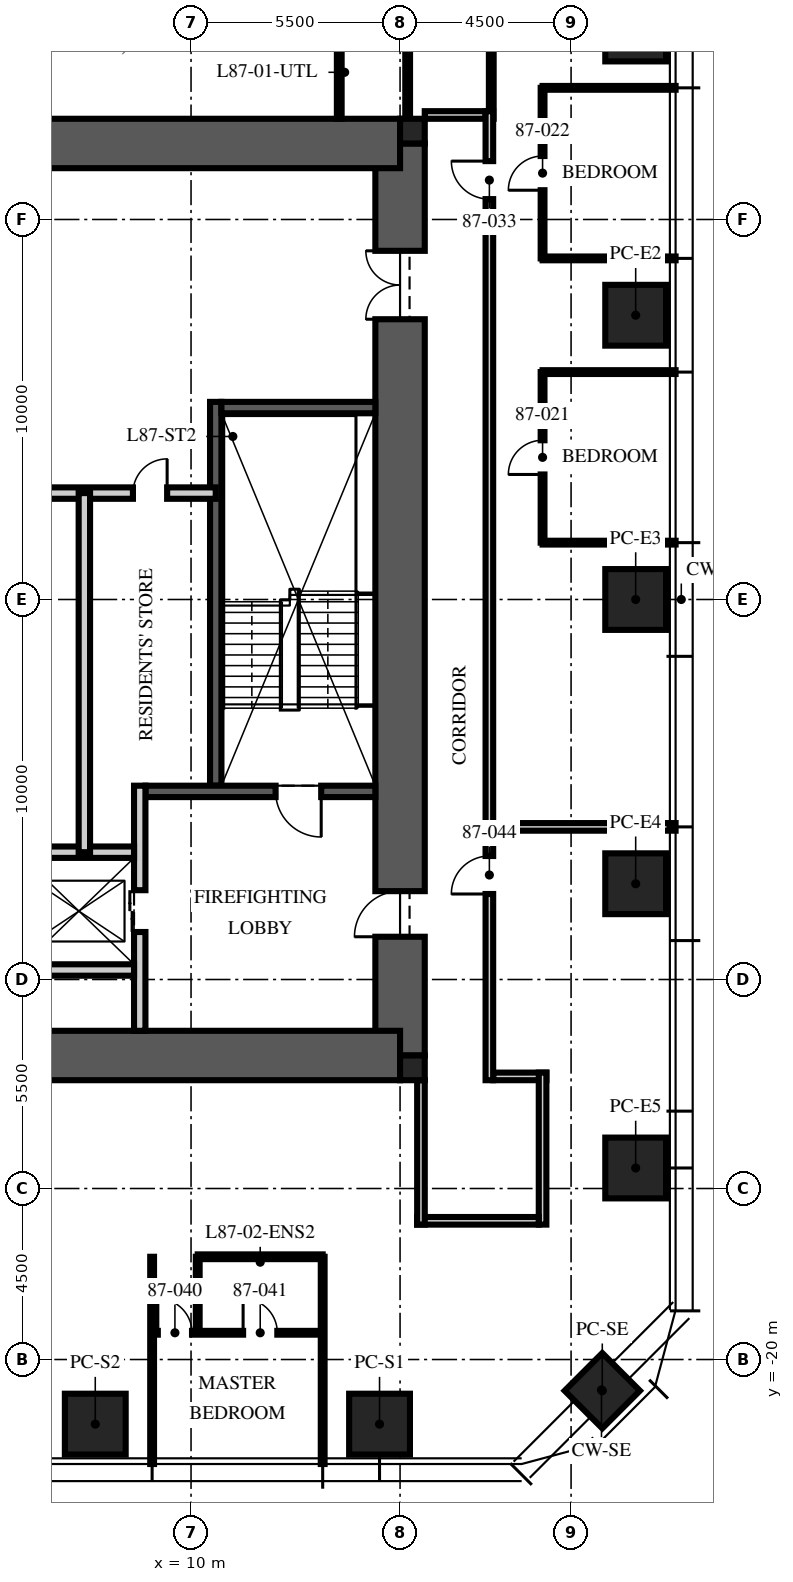
"""IFC4 building model, lengths in metres.
Left out: names, types, materials, properties, quantities, classifications, styles, units other than length and angle.
Written with IfcOpenShell. Run it as: python <this file> out.ifc"""

import sys

from ifc_helpers import new_model, si_unit, direction, frame, frame_2d, origin, origin_2d, place, context, subcontext, project, spatial, rectangle, extrude, element, fill, save


model = new_model("IFC4")
c1 = context("Model", 3, precision=1e-05, world=origin(), true_north=direction((0.0, 1.0)))
c2 = subcontext(c1, "Body", "Model", "MODEL_VIEW")
j1 = project(units=[si_unit("LENGTHUNIT", "METRE"), si_unit("PLANEANGLEUNIT", "RADIAN")], contexts=[c1])
p1 = place(None, origin())
s1 = spatial("IfcSite", under=j1, at=p1, CompositionType="ELEMENT")
p2 = place(p1, origin())
s2 = spatial("IfcBuilding", under=s1, at=p2, CompositionType="ELEMENT")
p3 = place(p2, frame((0.0, 0.0, 345.75)))
s3 = spatial("IfcBuildingStorey", under=s2, at=p3, CompositionType="ELEMENT", Elevation=345.75)
p4 = place(p3, frame((15.5, -12.0, -0.25), z_axis=(0.0, 0.0, 1.0), x_axis=(0.0, 1.0, 0.0)))
e1 = element("IfcWall", 1, at=p4, inside=s3, PredefinedType="SHEAR", context=c2, shape_type="SweptSolid", body=[
    extrude(rectangle(XDim=24.0, YDim=1.3, at=frame_2d((12.0, 0.0))), origin(), (0.0, 0.0, 1.0), 3.75),
])
p5 = place(p4, frame((3.125, 0.0, 0.25)))
e2 = element("IfcOpeningElement", 2, at=p5, cuts=e1, PredefinedType="OPENING", context=c2, shape_type="SweptSolid", body=[
    extrude(rectangle(XDim=1.2, YDim=2.1, at=frame_2d((0.6, 1.05))), frame((0.0, 0.66, 0.0), z_axis=(0.0, -1.0, 0.0), x_axis=(1.0, 0.0, 0.0)), (0.0, 0.0, 1.0), 1.32),
])
p6 = place(p4, frame((19.375, 0.0, 0.25)))
e3 = element("IfcOpeningElement", 3, at=p6, cuts=e1, PredefinedType="OPENING", context=c2, shape_type="SweptSolid", body=[
    extrude(rectangle(XDim=1.8, YDim=2.1, at=frame_2d((0.9, 1.05))), frame((0.0, 0.66, 0.0), z_axis=(0.0, -1.0, 0.0), x_axis=(1.0, 0.0, 0.0)), (0.0, 0.0, 1.0), 1.32),
])
for number, where, z_axis, x_axis in (
    (4, (-15.5, 12.0, -0.25), (0.0, 0.0, 1.0), (1.0, 0.0, 0.0)),
    (5, (-15.5, -12.0, -0.25), (0.0, 0.0, 1.0), (1.0, 0.0, 0.0)),
):
    element("IfcWall", number, at=place(p3, frame(where, z_axis=z_axis, x_axis=x_axis)), inside=s3, PredefinedType="SHEAR", context=c2, shape_type="SweptSolid", body=[
        extrude(rectangle(XDim=31.0, YDim=1.3, at=frame_2d((15.5, 0.0))), origin(), (0.0, 0.0, 1.0), 3.75),
    ])
for number, where, z_axis, x_axis in (
    (6, (15.825, 12.325, -0.25), (0.0, 0.0, 1.0), (1.0, 0.0, 0.0)),
    (7, (15.825, -12.325, -0.25), (0.0, 0.0, 1.0), (1.0, 0.0, 0.0)),
):
    element("IfcColumn", number, at=place(p3, frame(where, z_axis=z_axis, x_axis=x_axis)), inside=s3, PredefinedType="COLUMN", context=c2, shape_type="SweptSolid", body=[
        extrude(rectangle(XDim=0.65, YDim=0.65, at=origin_2d()), origin(), (0.0, 0.0, 1.0), 3.75),
    ])
for number, where, z_axis, x_axis in (
    (8, (21.7, 14.96, 0.0), (0.0, 0.0, 1.0), (0.0, 1.0, 0.0)),
    (9, (21.7, 7.48, 0.0), (0.0, 0.0, 1.0), (0.0, 1.0, 0.0)),
    (10, (21.7, 0.0, 0.0), (0.0, 0.0, 1.0), (0.0, 1.0, 0.0)),
    (11, (21.7, -7.48, 0.0), (0.0, 0.0, 1.0), (0.0, 1.0, 0.0)),
    (12, (21.7, -14.96, 0.0), (0.0, 0.0, 1.0), (0.0, 1.0, 0.0)),
    (13, (14.96, -21.7, 0.0), (0.0, 0.0, 1.0), (1.0, 0.0, 0.0)),
    (14, (7.48, -21.7, 0.0), (0.0, 0.0, 1.0), (1.0, 0.0, 0.0)),
):
    element("IfcColumn", number, at=place(p3, frame(where, z_axis=z_axis, x_axis=x_axis)), inside=s3, PredefinedType="COLUMN", context=c2, shape_type="SweptSolid", body=[
        extrude(rectangle(XDim=1.6, YDim=1.6, at=origin_2d()), origin(), (0.0, 0.0, 1.0), 3.75),
    ])
p7 = place(p3, frame((20.821, -20.821, 0.0), z_axis=(0.0, 0.0, 1.0), x_axis=(0.707106781187, 0.707106781187, 0.0)))
e15 = element("IfcColumn", 15, at=p7, inside=s3, PredefinedType="COLUMN", context=c2, shape_type="SweptSolid", body=[
    extrude(rectangle(XDim=1.4, YDim=1.4, at=origin_2d()), origin(), (0.0, 0.0, 1.0), 3.75),
])
p8 = place(p3, frame((10.65, -4.9, 0.0), z_axis=(0.0, 0.0, 1.0), x_axis=(0.0, 1.0, 0.0)))
e16 = element("IfcWall", 16, at=p8, inside=s3, PredefinedType="SOLIDWALL", context=c2, shape_type="SweptSolid", body=[
    extrude(rectangle(XDim=10.1, YDim=0.3, at=frame_2d((5.05, 0.0))), origin(), (0.0, 0.0, 1.0), 3.5),
])
p9 = place(p3, frame((14.85, -5.05, 0.0), z_axis=(0.0, 0.0, 1.0), x_axis=(-1.0, 0.0, 0.0)))
e17 = element("IfcWall", 17, at=p9, inside=s3, PredefinedType="SOLIDWALL", context=c2, shape_type="SweptSolid", body=[
    extrude(rectangle(XDim=6.05, YDim=0.3, at=frame_2d((3.025, 0.0))), origin(), (0.0, 0.0, 1.0), 3.5),
])
p10 = place(p9, frame((1.425, 0.0, 0.0)))
e18 = element("IfcOpeningElement", 18, at=p10, cuts=e17, PredefinedType="OPENING", context=c2, shape_type="SweptSolid", body=[
    extrude(rectangle(XDim=1.2, YDim=2.1, at=frame_2d((0.6, 1.05))), frame((0.0, 0.16, 0.0), z_axis=(0.0, -1.0, 0.0), x_axis=(1.0, 0.0, 0.0)), (0.0, 0.0, 1.0), 0.32),
])
p11 = place(p3, frame((14.85, 5.05, 0.0), z_axis=(0.0, 0.0, 1.0), x_axis=(-1.0, 0.0, 0.0)))
e19 = element("IfcWall", 19, at=p11, inside=s3, PredefinedType="SOLIDWALL", context=c2, shape_type="SweptSolid", body=[
    extrude(rectangle(XDim=4.05, YDim=0.3, at=frame_2d((2.025, 0.0))), origin(), (0.0, 0.0, 1.0), 3.5),
])
p12 = place(p3, frame((8.65, -11.35, 0.0), z_axis=(0.0, 0.0, 1.0), x_axis=(0.0, 1.0, 0.0)))
e20 = element("IfcWall", 20, at=p12, inside=s3, PredefinedType="PARTITIONING", context=c2, shape_type="SweptSolid", body=[
    extrude(rectangle(XDim=6.45, YDim=0.3, at=frame_2d((3.225, 0.0))), origin(), (0.0, 0.0, 1.0), 3.5),
])
p13 = place(p12, frame((2.6, 0.0, 0.0)))
e21 = element("IfcOpeningElement", 21, at=p13, cuts=e20, PredefinedType="OPENING", context=c2, shape_type="SweptSolid", body=[
    extrude(rectangle(XDim=1.1, YDim=2.1, at=frame_2d((0.55, 1.05))), frame((0.0, 0.16, 0.0), z_axis=(0.0, -1.0, 0.0), x_axis=(1.0, 0.0, 0.0)), (0.0, 0.0, 1.0), 0.32),
])
p14 = place(p3, frame((-8.5, -6.65, 0.0), z_axis=(0.0, 0.0, 1.0), x_axis=(1.0, 0.0, 0.0)))
e22 = element("IfcWall", 22, at=p14, inside=s3, PredefinedType="PARTITIONING", context=c2, shape_type="SweptSolid", body=[
    extrude(rectangle(XDim=17.0, YDim=0.3, at=frame_2d((8.5, 0.0))), origin(), (0.0, 0.0, 1.0), 3.5),
])
p15 = place(p14, frame((7.8, 0.0, 0.0)))
e23 = element("IfcOpeningElement", 23, at=p15, cuts=e22, PredefinedType="OPENING", context=c2, shape_type="SweptSolid", body=[
    extrude(rectangle(XDim=1.3, YDim=2.4, at=frame_2d((0.65, 1.2))), frame((0.0, 0.16, 0.0), z_axis=(0.0, -1.0, 0.0), x_axis=(1.0, 0.0, 0.0)), (0.0, 0.0, 1.0), 0.32),
])
p16 = place(p14, frame((5.65, 0.0, 0.0)))
e24 = element("IfcOpeningElement", 24, at=p16, cuts=e22, PredefinedType="OPENING", context=c2, shape_type="SweptSolid", body=[
    extrude(rectangle(XDim=0.9, YDim=2.1, at=frame_2d((0.45, 1.05))), frame((0.0, 0.16, 0.0), z_axis=(0.0, -1.0, 0.0), x_axis=(1.0, 0.0, 0.0)), (0.0, 0.0, 1.0), 0.32),
])
p17 = place(p14, frame((10.4, 0.0, 0.0)))
e25 = element("IfcOpeningElement", 25, at=p17, cuts=e22, PredefinedType="OPENING", context=c2, shape_type="SweptSolid", body=[
    extrude(rectangle(XDim=0.9, YDim=2.1, at=frame_2d((0.45, 1.05))), frame((0.0, 0.16, 0.0), z_axis=(0.0, -1.0, 0.0), x_axis=(1.0, 0.0, 0.0)), (0.0, 0.0, 1.0), 0.32),
])
p18 = place(p3, frame((5.6, -9.75, 0.0), z_axis=(0.0, 0.0, 1.0), x_axis=(1.0, 0.0, 0.0)))
e26 = element("IfcWall", 26, at=p18, inside=s3, PredefinedType="PARTITIONING", context=c2, shape_type="SweptSolid", body=[
    extrude(rectangle(XDim=2.9, YDim=0.3, at=frame_2d((1.45, 0.0))), origin(), (0.0, 0.0, 1.0), 3.5),
])
p19 = place(p3, frame((-10.65, 2.8, 0.0), z_axis=(0.0, 0.0, 1.0), x_axis=(1.0, 0.0, 0.0)))
e27 = element("IfcWall", 27, at=p19, inside=s3, PredefinedType="PARTITIONING", context=c2, shape_type="SweptSolid", body=[
    extrude(rectangle(XDim=21.3, YDim=0.3, at=frame_2d((10.65, 0.0))), origin(), (0.0, 0.0, 1.0), 3.5),
])
p20 = place(p19, frame((10.05, 0.0, 0.0)))
e28 = element("IfcOpeningElement", 28, at=p20, cuts=e27, PredefinedType="OPENING", context=c2, shape_type="SweptSolid", body=[
    extrude(rectangle(XDim=1.2, YDim=2.1, at=frame_2d((0.6, 1.05))), frame((0.0, 0.16, 0.0), z_axis=(0.0, -1.0, 0.0), x_axis=(1.0, 0.0, 0.0)), (0.0, 0.0, 1.0), 0.32),
])
p21 = place(p19, frame((19.121, 0.0, 0.0)))
e29 = element("IfcOpeningElement", 29, at=p21, cuts=e27, PredefinedType="OPENING", context=c2, shape_type="SweptSolid", body=[
    extrude(rectangle(XDim=0.9, YDim=2.1, at=frame_2d((0.45, 1.05))), frame((0.0, 0.16, 0.0), z_axis=(0.0, -1.0, 0.0), x_axis=(1.0, 0.0, 0.0)), (0.0, 0.0, 1.0), 0.32),
])
p22 = place(p3, frame((7.193, -6.65, 0.0), z_axis=(0.0, 0.0, 1.0), x_axis=(0.0, 1.0, 0.0)))
e30 = element("IfcWall", 30, at=p22, inside=s3, PredefinedType="PARTITIONING", context=c2, shape_type="SweptSolid", body=[
    extrude(rectangle(XDim=9.45, YDim=0.3, at=frame_2d((4.725, 0.0))), origin(), (0.0, 0.0, 1.0), 3.5),
])
p23 = place(p3, frame((17.95, -12.55, 0.0), z_axis=(0.0, 0.0, 1.0), x_axis=(1.0, 0.0, 0.0)))
e31 = element("IfcWall", 31, at=p23, inside=s3, PredefinedType="PARTITIONING", context=c2, shape_type="SweptSolid", body=[
    extrude(rectangle(XDim=1.4, YDim=0.2, at=frame_2d((0.7, 0.0))), origin(), (0.0, 0.0, 1.0), 3.5),
])
p24 = place(p3, frame((19.25, -12.45, 0.0), z_axis=(0.0, 0.0, 1.0), x_axis=(0.0, -1.0, 0.0)))
e32 = element("IfcWall", 32, at=p24, inside=s3, PredefinedType="PARTITIONING", context=c2, shape_type="SweptSolid", body=[
    extrude(rectangle(XDim=4.0, YDim=0.2, at=frame_2d((2.0, 0.0))), origin(), (0.0, 0.0, 1.0), 2.9),
])
p25 = place(p3, frame((19.15, -16.35, 0.0), z_axis=(0.0, 0.0, 1.0), x_axis=(-1.0, 0.0, 0.0)))
e33 = element("IfcWall", 33, at=p25, inside=s3, PredefinedType="PARTITIONING", context=c2, shape_type="SweptSolid", body=[
    extrude(rectangle(XDim=3.2, YDim=0.2, at=frame_2d((1.6, 0.0))), origin(), (0.0, 0.0, 1.0), 2.5),
])
p26 = place(p3, frame((16.05, -16.45, 0.0), z_axis=(0.0, 0.0, 1.0), x_axis=(0.0, 1.0, 0.0)))
e34 = element("IfcWall", 34, at=p26, inside=s3, PredefinedType="PARTITIONING", context=c2, shape_type="SweptSolid", body=[
    extrude(rectangle(XDim=3.8, YDim=0.2, at=frame_2d((1.9, 0.0))), origin(), (0.0, 0.0, 1.0), 2.5),
])
p27 = place(p3, frame((16.15, 12.75, 0.0), z_axis=(0.0, 0.0, 1.0), x_axis=(1.0, 0.0, 0.0)))
e35 = element("IfcWall", 35, at=p27, inside=s3, PredefinedType="PARTITIONING", context=c2, shape_type="SweptSolid", body=[
    extrude(rectangle(XDim=1.6, YDim=0.2, at=frame_2d((0.8, 0.0))), origin(), (0.0, 0.0, 1.0), 2.5),
])
p28 = place(p3, frame((17.95, -5.984, 0.0), z_axis=(0.0, 0.0, 1.0), x_axis=(1.0, 0.0, 0.0)))
e36 = element("IfcWall", 36, at=p28, inside=s3, PredefinedType="PARTITIONING", context=c2, shape_type="SweptSolid", body=[
    extrude(rectangle(XDim=4.8, YDim=0.2, at=frame_2d((2.4, 0.0))), origin(), (0.0, 0.0, 1.0), 2.91),
])
for number, where, z_axis, x_axis in (
    (37, (19.25, 1.496, 0.0), (0.0, 0.0, 1.0), (1.0, 0.0, 0.0)),
    (38, (19.25, 5.984, 0.0), (0.0, 0.0, 1.0), (1.0, 0.0, 0.0)),
    (39, (19.25, 8.976, 0.0), (0.0, 0.0, 1.0), (1.0, 0.0, 0.0)),
    (40, (19.25, 13.464, 0.0), (0.0, 0.0, 1.0), (1.0, 0.0, 0.0)),
):
    element("IfcWall", number, at=place(p3, frame(where, z_axis=z_axis, x_axis=x_axis)), inside=s3, PredefinedType="PARTITIONING", context=c2, shape_type="SweptSolid", body=[
        extrude(rectangle(XDim=3.5, YDim=0.1, at=frame_2d((1.75, 0.0))), origin(), (0.0, 0.0, 1.0), 2.91),
    ])
for number, where, z_axis, x_axis in (
    (41, (8.976, -17.296, 0.0), (0.0, 0.0, 1.0), (0.0, -1.0, 0.0)),
    (42, (13.464, -17.296, 0.0), (0.0, 0.0, 1.0), (0.0, -1.0, 0.0)),
):
    element("IfcWall", number, at=place(p3, frame(where, z_axis=z_axis, x_axis=x_axis)), inside=s3, PredefinedType="PARTITIONING", context=c2, shape_type="SweptSolid", body=[
        extrude(rectangle(XDim=5.454, YDim=0.1, at=frame_2d((2.727, 0.0))), origin(), (0.0, 0.0, 1.0), 2.91),
    ])
p29 = place(p3, frame((19.25, 1.496, 0.0), z_axis=(0.0, 0.0, 1.0), x_axis=(0.0, 1.0, 0.0)))
e43 = element("IfcWall", 43, at=p29, inside=s3, PredefinedType="PARTITIONING", context=c2, shape_type="SweptSolid", body=[
    extrude(rectangle(XDim=4.488, YDim=0.1, at=frame_2d((2.244, 0.0))), origin(), (0.0, 0.0, 1.0), 2.81),
])
p30 = place(p29, frame((1.794, 0.0, 0.0)))
e44 = element("IfcOpeningElement", 44, at=p30, cuts=e43, PredefinedType="OPENING", context=c2, shape_type="SweptSolid", body=[
    extrude(rectangle(XDim=0.9, YDim=2.1, at=frame_2d((0.45, 1.05))), frame((0.0, 0.06, 0.0), z_axis=(0.0, -1.0, 0.0), x_axis=(1.0, 0.0, 0.0)), (0.0, 0.0, 1.0), 0.12),
])
p31 = place(p3, frame((19.25, 8.976, 0.0), z_axis=(0.0, 0.0, 1.0), x_axis=(0.0, 1.0, 0.0)))
e45 = element("IfcWall", 45, at=p31, inside=s3, PredefinedType="PARTITIONING", context=c2, shape_type="SweptSolid", body=[
    extrude(rectangle(XDim=4.488, YDim=0.1, at=frame_2d((2.244, 0.0))), origin(), (0.0, 0.0, 1.0), 2.81),
])
p32 = place(p31, frame((1.794, 0.0, 0.0)))
e46 = element("IfcOpeningElement", 46, at=p32, cuts=e45, PredefinedType="OPENING", context=c2, shape_type="SweptSolid", body=[
    extrude(rectangle(XDim=0.9, YDim=2.1, at=frame_2d((0.45, 1.05))), frame((0.0, 0.06, 0.0), z_axis=(0.0, -1.0, 0.0), x_axis=(1.0, 0.0, 0.0)), (0.0, 0.0, 1.0), 0.12),
])
for number, where, z_axis, x_axis in (
    (47, (17.9, 12.65, 0.0), (0.0, 0.0, 1.0), (0.0, 1.0, 0.0)),
    (48, (15.7, 12.65, 0.0), (0.0, 0.0, 1.0), (0.0, 1.0, 0.0)),
):
    element("IfcWall", number, at=place(p3, frame(where, z_axis=z_axis, x_axis=x_axis)), inside=s3, PredefinedType="PARTITIONING", context=c2, shape_type="SweptSolid", body=[
        extrude(rectangle(XDim=3.346, YDim=0.125, at=frame_2d((1.673, 0.0))), origin(), (0.0, 0.0, 1.0), 2.5),
    ])
p33 = place(p3, frame((13.9, 12.65, 0.0), z_axis=(0.0, 0.0, 1.0), x_axis=(0.0, 1.0, 0.0)))
e49 = element("IfcWall", 49, at=p33, inside=s3, PredefinedType="PARTITIONING", context=c2, shape_type="SweptSolid", body=[
    extrude(rectangle(XDim=3.346, YDim=0.125, at=frame_2d((1.673, 0.0))), origin(), (0.0, 0.0, 1.0), 3.5),
])
p34 = place(p3, frame((8.976, -19.296, 0.0), z_axis=(0.0, 0.0, 1.0), x_axis=(1.0, 0.0, 0.0)))
e50 = element("IfcWall", 50, at=p34, inside=s3, PredefinedType="PARTITIONING", context=c2, shape_type="SweptSolid", body=[
    extrude(rectangle(XDim=4.488, YDim=0.1, at=frame_2d((2.244, 0.0))), origin(), (0.0, 0.0, 1.0), 2.81),
])
p35 = place(p34, frame((0.15, 0.0, 0.0)))
e51 = element("IfcOpeningElement", 51, at=p35, cuts=e50, PredefinedType="OPENING", context=c2, shape_type="SweptSolid", body=[
    extrude(rectangle(XDim=0.9, YDim=2.1, at=frame_2d((0.45, 1.05))), frame((0.0, 0.06, 0.0), z_axis=(0.0, -1.0, 0.0), x_axis=(1.0, 0.0, 0.0)), (0.0, 0.0, 1.0), 0.12),
])
p36 = place(p34, frame((2.394, 0.0, 0.0)))
e52 = element("IfcOpeningElement", 52, at=p36, cuts=e50, PredefinedType="OPENING", context=c2, shape_type="SweptSolid", body=[
    extrude(rectangle(XDim=0.9, YDim=2.1, at=frame_2d((0.45, 1.05))), frame((0.0, 0.06, 0.0), z_axis=(0.0, -1.0, 0.0), x_axis=(1.0, 0.0, 0.0)), (0.0, 0.0, 1.0), 0.12),
])
p37 = place(p3, frame((10.176, -17.296, 0.0), z_axis=(0.0, 0.0, 1.0), x_axis=(0.0, -1.0, 0.0)))
e53 = element("IfcWall", 53, at=p37, inside=s3, PredefinedType="PARTITIONING", context=c2, shape_type="SweptSolid", body=[
    extrude(rectangle(XDim=2.0, YDim=0.1, at=frame_2d((1.0, 0.0))), origin(), (0.0, 0.0, 1.0), 3.5),
])
p38 = place(p3, frame((10.176, -17.296, 0.0), z_axis=(0.0, 0.0, 1.0), x_axis=(1.0, 0.0, 0.0)))
e54 = element("IfcWall", 54, at=p38, inside=s3, PredefinedType="PARTITIONING", context=c2, shape_type="SweptSolid", body=[
    extrude(rectangle(XDim=3.288, YDim=0.125, at=frame_2d((1.644, 0.0))), origin(), (0.0, 0.0, 1.0), 2.81),
])
p39 = place(p3, frame((17.85, -12.65, 0.0), z_axis=(0.0, 0.0, 1.0), x_axis=(0.0, 1.0, 0.0)))
e55 = element("IfcWall", 55, at=p39, inside=s3, PredefinedType="PARTITIONING", context=c2, shape_type="SweptSolid", body=[
    extrude(rectangle(XDim=25.5, YDim=0.2, at=frame_2d((12.75, 0.0))), origin(), (0.0, 0.0, 1.0), 2.81),
])
p40 = place(p39, frame((23.186, 0.0, 0.0)))
e56 = element("IfcOpeningElement", 56, at=p40, cuts=e55, PredefinedType="OPENING", context=c2, shape_type="SweptSolid", body=[
    extrude(rectangle(XDim=1.0, YDim=2.2, at=frame_2d((0.5, 1.1))), frame((0.0, 0.11, 0.0), z_axis=(0.0, -1.0, 0.0), x_axis=(1.0, 0.0, 0.0)), (0.0, 0.0, 1.0), 0.22),
])
p41 = place(p39, frame((4.9, 0.0, 0.0)))
e57 = element("IfcOpeningElement", 57, at=p41, cuts=e55, PredefinedType="OPENING", context=c2, shape_type="SweptSolid", body=[
    extrude(rectangle(XDim=1.0, YDim=2.2, at=frame_2d((0.5, 1.1))), frame((0.0, 0.11, 0.0), z_axis=(0.0, -1.0, 0.0), x_axis=(1.0, 0.0, 0.0)), (0.0, 0.0, 1.0), 0.22),
])
p42 = place(p10, origin())
e58 = element("IfcDoor", 58, at=p42, inside=s3, OperationType="SINGLE_SWING_LEFT", PredefinedType="DOOR", context=c2, shape_type="SweptSolid", body=[
    extrude(rectangle(XDim=1.2, YDim=2.1, at=frame_2d((0.6, 1.05))), frame((0.0, 0.025, 0.0), z_axis=(0.0, -1.0, 0.0), x_axis=(1.0, 0.0, 0.0)), (0.0, 0.0, 1.0), 0.05),
])
fill(e18, e58)
p43 = place(p5, origin())
e59 = element("IfcDoor", 59, at=p43, inside=s3, OperationType="SINGLE_SWING_LEFT", PredefinedType="DOOR", context=c2, shape_type="SweptSolid", body=[
    extrude(rectangle(XDim=1.2, YDim=2.1, at=frame_2d((0.6, 1.05))), frame((0.0, 0.025, 0.0), z_axis=(0.0, -1.0, 0.0), x_axis=(1.0, 0.0, 0.0)), (0.0, 0.0, 1.0), 0.05),
])
fill(e2, e59)
p44 = place(p6, origin())
e60 = element("IfcDoor", 60, at=p44, inside=s3, OperationType="DOUBLE_DOOR_SINGLE_SWING", PredefinedType="DOOR", context=c2, shape_type="SweptSolid", body=[
    extrude(rectangle(XDim=1.8, YDim=2.1, at=frame_2d((0.9, 1.05))), frame((0.0, 0.025, 0.0), z_axis=(0.0, -1.0, 0.0), x_axis=(1.0, 0.0, 0.0)), (0.0, 0.0, 1.0), 0.05),
])
fill(e3, e60)
p45 = place(p13, origin())
e61 = element("IfcDoor", 61, at=p45, inside=s3, OperationType="DOUBLE_DOOR_SLIDING", PredefinedType="DOOR", context=c2, shape_type="SweptSolid", body=[
    extrude(rectangle(XDim=1.1, YDim=2.1, at=frame_2d((0.55, 1.05))), frame((0.0, 0.025, 0.0), z_axis=(0.0, -1.0, 0.0), x_axis=(1.0, 0.0, 0.0)), (0.0, 0.0, 1.0), 0.05),
])
fill(e21, e61)
p46 = place(p21, origin())
e62 = element("IfcDoor", 62, at=p46, inside=s3, OperationType="SINGLE_SWING_RIGHT", PredefinedType="DOOR", context=c2, shape_type="SweptSolid", body=[
    extrude(rectangle(XDim=0.9, YDim=2.1, at=frame_2d((0.45, 1.05))), frame((0.0, 0.025, 0.0), z_axis=(0.0, -1.0, 0.0), x_axis=(1.0, 0.0, 0.0)), (0.0, 0.0, 1.0), 0.05),
])
fill(e29, e62)
p47 = place(p30, origin())
e63 = element("IfcDoor", 63, at=p47, inside=s3, OperationType="SINGLE_SWING_LEFT", PredefinedType="DOOR", context=c2, shape_type="SweptSolid", body=[
    extrude(rectangle(XDim=0.9, YDim=2.1, at=frame_2d((0.45, 1.05))), frame((0.0, 0.025, 0.0), z_axis=(0.0, -1.0, 0.0), x_axis=(1.0, 0.0, 0.0)), (0.0, 0.0, 1.0), 0.05),
])
fill(e44, e63)
p48 = place(p32, origin())
e64 = element("IfcDoor", 64, at=p48, inside=s3, OperationType="SINGLE_SWING_LEFT", PredefinedType="DOOR", context=c2, shape_type="SweptSolid", body=[
    extrude(rectangle(XDim=0.9, YDim=2.1, at=frame_2d((0.45, 1.05))), frame((0.0, 0.025, 0.0), z_axis=(0.0, -1.0, 0.0), x_axis=(1.0, 0.0, 0.0)), (0.0, 0.0, 1.0), 0.05),
])
fill(e46, e64)
p49 = place(p40, origin())
e65 = element("IfcDoor", 65, at=p49, inside=s3, OperationType="SINGLE_SWING_RIGHT", PredefinedType="DOOR", context=c2, shape_type="SweptSolid", body=[
    extrude(rectangle(XDim=1.0, YDim=2.2, at=frame_2d((0.5, 1.1))), frame((0.0, 0.025, 0.0), z_axis=(0.0, -1.0, 0.0), x_axis=(1.0, 0.0, 0.0)), (0.0, 0.0, 1.0), 0.05),
])
fill(e56, e65)
p50 = place(p35, origin())
e66 = element("IfcDoor", 66, at=p50, inside=s3, OperationType="SINGLE_SWING_LEFT", PredefinedType="DOOR", context=c2, shape_type="SweptSolid", body=[
    extrude(rectangle(XDim=0.9, YDim=2.1, at=frame_2d((0.45, 1.05))), frame((0.0, 0.025, 0.0), z_axis=(0.0, -1.0, 0.0), x_axis=(1.0, 0.0, 0.0)), (0.0, 0.0, 1.0), 0.05),
])
fill(e51, e66)
p51 = place(p36, origin())
e67 = element("IfcDoor", 67, at=p51, inside=s3, OperationType="SINGLE_SWING_LEFT", PredefinedType="DOOR", context=c2, shape_type="SweptSolid", body=[
    extrude(rectangle(XDim=0.9, YDim=2.1, at=frame_2d((0.45, 1.05))), frame((0.0, 0.025, 0.0), z_axis=(0.0, -1.0, 0.0), x_axis=(1.0, 0.0, 0.0)), (0.0, 0.0, 1.0), 0.05),
])
fill(e52, e67)
p52 = place(p41, origin())
e68 = element("IfcDoor", 68, at=p52, inside=s3, OperationType="SINGLE_SWING_LEFT", PredefinedType="DOOR", context=c2, shape_type="SweptSolid", body=[
    extrude(rectangle(XDim=1.0, YDim=2.2, at=frame_2d((0.5, 1.1))), frame((0.0, 0.025, 0.0), z_axis=(0.0, -1.0, 0.0), x_axis=(1.0, 0.0, 0.0)), (0.0, 0.0, 1.0), 0.05),
])
fill(e57, e68)
save(model, sys.argv[1])
